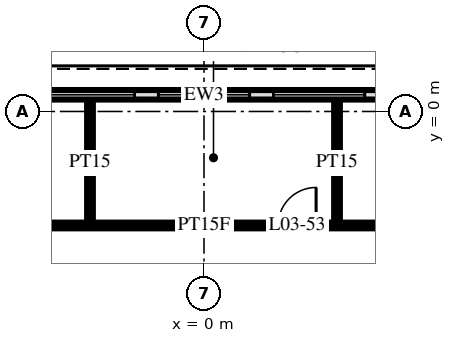
"""IFC4 building model, lengths in metres.
Left out: names, types, materials, properties, quantities, classifications, styles, units other than length and angle.
Written with IfcOpenShell. Run it as: python <this file> out.ifc"""

import sys

from ifc_helpers import new_model, si_unit, direction, frame, frame_2d, origin, place, context, subcontext, project, spatial, rectangle, extrude, element, fill, save


model = new_model("IFC4")
c1 = context("Model", 3, precision=1e-05, world=origin(), true_north=direction((0.0, 1.0)))
c2 = subcontext(c1, "Body", "Model", "MODEL_VIEW")
j1 = project(units=[si_unit("LENGTHUNIT", "METRE"), si_unit("PLANEANGLEUNIT", "RADIAN")], contexts=[c1])
p1 = place(None, origin())
s1 = spatial("IfcSite", under=j1, at=p1, CompositionType="ELEMENT")
p2 = place(p1, origin())
s2 = spatial("IfcBuilding", under=s1, at=p2, CompositionType="ELEMENT")
p3 = place(p2, frame((0.0, 0.0, 18.0)))
s3 = spatial("IfcBuildingStorey", under=s2, at=p3, CompositionType="ELEMENT", Elevation=18.0)
p4 = place(p3, frame((28.713, 0.439, 0.0), z_axis=(0.0, 0.0, 1.0), x_axis=(-1.0, 0.0, 0.0)))
e1 = element("IfcWall", 1, at=p4, inside=s3, PredefinedType="SOLIDWALL", context=c2, shape_type="SweptSolid", body=[
    extrude(rectangle(XDim=57.426, YDim=0.25, at=frame_2d((28.713, 0.0))), origin(), (0.0, 0.0, 1.0), 5.72),
])
p5 = place(p4, frame((0.252, 0.0, 0.858)))
e2 = element("IfcOpeningElement", 2, at=p5, cuts=e1, PredefinedType="OPENING", context=c2, shape_type="SweptSolid", body=[
    extrude(rectangle(XDim=2.4, YDim=3.6, at=frame_2d((1.2, 1.8))), frame((0.0, 0.135, 0.0), z_axis=(0.0, -1.0, 0.0), x_axis=(1.0, 0.0, 0.0)), (0.0, 0.0, 1.0), 0.27),
])
p6 = place(p4, frame((3.281, 0.0, 0.858)))
e3 = element("IfcOpeningElement", 3, at=p6, cuts=e1, PredefinedType="OPENING", context=c2, shape_type="SweptSolid", body=[
    extrude(rectangle(XDim=2.4, YDim=3.6, at=frame_2d((1.2, 1.8))), frame((0.0, 0.135, 0.0), z_axis=(0.0, -1.0, 0.0), x_axis=(1.0, 0.0, 0.0)), (0.0, 0.0, 1.0), 0.27),
])
p7 = place(p4, frame((6.31, 0.0, 0.858)))
e4 = element("IfcOpeningElement", 4, at=p7, cuts=e1, PredefinedType="OPENING", context=c2, shape_type="SweptSolid", body=[
    extrude(rectangle(XDim=2.4, YDim=3.6, at=frame_2d((1.2, 1.8))), frame((0.0, 0.135, 0.0), z_axis=(0.0, -1.0, 0.0), x_axis=(1.0, 0.0, 0.0)), (0.0, 0.0, 1.0), 0.27),
])
p8 = place(p4, frame((9.339, 0.0, 0.858)))
e5 = element("IfcOpeningElement", 5, at=p8, cuts=e1, PredefinedType="OPENING", context=c2, shape_type="SweptSolid", body=[
    extrude(rectangle(XDim=2.4, YDim=3.6, at=frame_2d((1.2, 1.8))), frame((0.0, 0.135, 0.0), z_axis=(0.0, -1.0, 0.0), x_axis=(1.0, 0.0, 0.0)), (0.0, 0.0, 1.0), 0.27),
])
p9 = place(p4, frame((12.368, 0.0, 0.858)))
e6 = element("IfcOpeningElement", 6, at=p9, cuts=e1, PredefinedType="OPENING", context=c2, shape_type="SweptSolid", body=[
    extrude(rectangle(XDim=2.4, YDim=3.6, at=frame_2d((1.2, 1.8))), frame((0.0, 0.135, 0.0), z_axis=(0.0, -1.0, 0.0), x_axis=(1.0, 0.0, 0.0)), (0.0, 0.0, 1.0), 0.27),
])
p10 = place(p4, frame((15.397, 0.0, 0.858)))
e7 = element("IfcOpeningElement", 7, at=p10, cuts=e1, PredefinedType="OPENING", context=c2, shape_type="SweptSolid", body=[
    extrude(rectangle(XDim=2.4, YDim=3.6, at=frame_2d((1.2, 1.8))), frame((0.0, 0.135, 0.0), z_axis=(0.0, -1.0, 0.0), x_axis=(1.0, 0.0, 0.0)), (0.0, 0.0, 1.0), 0.27),
])
p11 = place(p4, frame((18.426, 0.0, 0.858)))
e8 = element("IfcOpeningElement", 8, at=p11, cuts=e1, PredefinedType="OPENING", context=c2, shape_type="SweptSolid", body=[
    extrude(rectangle(XDim=2.4, YDim=3.6, at=frame_2d((1.2, 1.8))), frame((0.0, 0.135, 0.0), z_axis=(0.0, -1.0, 0.0), x_axis=(1.0, 0.0, 0.0)), (0.0, 0.0, 1.0), 0.27),
])
p12 = place(p4, frame((21.455, 0.0, 0.858)))
e9 = element("IfcOpeningElement", 9, at=p12, cuts=e1, PredefinedType="OPENING", context=c2, shape_type="SweptSolid", body=[
    extrude(rectangle(XDim=2.4, YDim=3.6, at=frame_2d((1.2, 1.8))), frame((0.0, 0.135, 0.0), z_axis=(0.0, -1.0, 0.0), x_axis=(1.0, 0.0, 0.0)), (0.0, 0.0, 1.0), 0.27),
])
p13 = place(p4, frame((24.484, 0.0, 0.858)))
e10 = element("IfcOpeningElement", 10, at=p13, cuts=e1, PredefinedType="OPENING", context=c2, shape_type="SweptSolid", body=[
    extrude(rectangle(XDim=2.4, YDim=3.6, at=frame_2d((1.2, 1.8))), frame((0.0, 0.135, 0.0), z_axis=(0.0, -1.0, 0.0), x_axis=(1.0, 0.0, 0.0)), (0.0, 0.0, 1.0), 0.27),
])
p14 = place(p4, frame((27.513, 0.0, 0.858)))
e11 = element("IfcOpeningElement", 11, at=p14, cuts=e1, PredefinedType="OPENING", context=c2, shape_type="SweptSolid", body=[
    extrude(rectangle(XDim=2.4, YDim=3.6, at=frame_2d((1.2, 1.8))), frame((0.0, 0.135, 0.0), z_axis=(0.0, -1.0, 0.0), x_axis=(1.0, 0.0, 0.0)), (0.0, 0.0, 1.0), 0.27),
])
p15 = place(p4, frame((30.542, 0.0, 0.858)))
e12 = element("IfcOpeningElement", 12, at=p15, cuts=e1, PredefinedType="OPENING", context=c2, shape_type="SweptSolid", body=[
    extrude(rectangle(XDim=2.4, YDim=3.6, at=frame_2d((1.2, 1.8))), frame((0.0, 0.135, 0.0), z_axis=(0.0, -1.0, 0.0), x_axis=(1.0, 0.0, 0.0)), (0.0, 0.0, 1.0), 0.27),
])
p16 = place(p4, frame((33.571, 0.0, 0.858)))
e13 = element("IfcOpeningElement", 13, at=p16, cuts=e1, PredefinedType="OPENING", context=c2, shape_type="SweptSolid", body=[
    extrude(rectangle(XDim=2.4, YDim=3.6, at=frame_2d((1.2, 1.8))), frame((0.0, 0.135, 0.0), z_axis=(0.0, -1.0, 0.0), x_axis=(1.0, 0.0, 0.0)), (0.0, 0.0, 1.0), 0.27),
])
p17 = place(p4, frame((36.6, 0.0, 0.858)))
e14 = element("IfcOpeningElement", 14, at=p17, cuts=e1, PredefinedType="OPENING", context=c2, shape_type="SweptSolid", body=[
    extrude(rectangle(XDim=2.4, YDim=3.6, at=frame_2d((1.2, 1.8))), frame((0.0, 0.135, 0.0), z_axis=(0.0, -1.0, 0.0), x_axis=(1.0, 0.0, 0.0)), (0.0, 0.0, 1.0), 0.27),
])
p18 = place(p4, frame((39.629, 0.0, 0.858)))
e15 = element("IfcOpeningElement", 15, at=p18, cuts=e1, PredefinedType="OPENING", context=c2, shape_type="SweptSolid", body=[
    extrude(rectangle(XDim=2.4, YDim=3.6, at=frame_2d((1.2, 1.8))), frame((0.0, 0.135, 0.0), z_axis=(0.0, -1.0, 0.0), x_axis=(1.0, 0.0, 0.0)), (0.0, 0.0, 1.0), 0.27),
])
p19 = place(p4, frame((42.658, 0.0, 0.858)))
e16 = element("IfcOpeningElement", 16, at=p19, cuts=e1, PredefinedType="OPENING", context=c2, shape_type="SweptSolid", body=[
    extrude(rectangle(XDim=2.4, YDim=3.6, at=frame_2d((1.2, 1.8))), frame((0.0, 0.135, 0.0), z_axis=(0.0, -1.0, 0.0), x_axis=(1.0, 0.0, 0.0)), (0.0, 0.0, 1.0), 0.27),
])
p20 = place(p4, frame((45.687, 0.0, 0.858)))
e17 = element("IfcOpeningElement", 17, at=p20, cuts=e1, PredefinedType="OPENING", context=c2, shape_type="SweptSolid", body=[
    extrude(rectangle(XDim=2.4, YDim=3.6, at=frame_2d((1.2, 1.8))), frame((0.0, 0.135, 0.0), z_axis=(0.0, -1.0, 0.0), x_axis=(1.0, 0.0, 0.0)), (0.0, 0.0, 1.0), 0.27),
])
p21 = place(p4, frame((48.716, 0.0, 0.858)))
e18 = element("IfcOpeningElement", 18, at=p21, cuts=e1, PredefinedType="OPENING", context=c2, shape_type="SweptSolid", body=[
    extrude(rectangle(XDim=2.4, YDim=3.6, at=frame_2d((1.2, 1.8))), frame((0.0, 0.135, 0.0), z_axis=(0.0, -1.0, 0.0), x_axis=(1.0, 0.0, 0.0)), (0.0, 0.0, 1.0), 0.27),
])
p22 = place(p4, frame((51.745, 0.0, 0.858)))
e19 = element("IfcOpeningElement", 19, at=p22, cuts=e1, PredefinedType="OPENING", context=c2, shape_type="SweptSolid", body=[
    extrude(rectangle(XDim=2.4, YDim=3.6, at=frame_2d((1.2, 1.8))), frame((0.0, 0.135, 0.0), z_axis=(0.0, -1.0, 0.0), x_axis=(1.0, 0.0, 0.0)), (0.0, 0.0, 1.0), 0.27),
])
p23 = place(p4, frame((54.774, 0.0, 0.858)))
e20 = element("IfcOpeningElement", 20, at=p23, cuts=e1, PredefinedType="OPENING", context=c2, shape_type="SweptSolid", body=[
    extrude(rectangle(XDim=2.4, YDim=3.6, at=frame_2d((1.2, 1.8))), frame((0.0, 0.135, 0.0), z_axis=(0.0, -1.0, 0.0), x_axis=(1.0, 0.0, 0.0)), (0.0, 0.0, 1.0), 0.27),
])
for number, where, z_axis, x_axis in (
    (21, (3.5, -3.0, 0.0), (0.0, 0.0, 1.0), (0.0, 1.0, 0.0)),
    (22, (-3.0, -3.0, 0.0), (0.0, 0.0, 1.0), (0.0, 1.0, 0.0)),
):
    element("IfcWall", number, at=place(p3, frame(where, z_axis=z_axis, x_axis=x_axis)), inside=s3, PredefinedType="PARTITIONING", context=c2, shape_type="SweptSolid", body=[
        extrude(rectangle(XDim=3.312, YDim=0.15, at=frame_2d((1.656, 0.0))), origin(), (0.0, 0.0, 1.0), 5.55),
    ])
p24 = place(p3, frame((-9.95, -3.0, 0.0), z_axis=(0.0, 0.0, 1.0), x_axis=(1.0, 0.0, 0.0)))
e23 = element("IfcWall", 23, at=p24, inside=s3, PredefinedType="PARTITIONING", context=c2, shape_type="SweptSolid", body=[
    extrude(rectangle(XDim=19.9, YDim=0.15, at=frame_2d((9.95, 0.0))), origin(), (0.0, 0.0, 1.0), 5.55),
])
p25 = place(p24, frame((2.0, 0.0, 0.0)))
e24 = element("IfcOpeningElement", 24, at=p25, cuts=e23, PredefinedType="OPENING", context=c2, shape_type="SweptSolid", body=[
    extrude(rectangle(XDim=1.0, YDim=2.1, at=frame_2d((0.5, 1.05))), frame((0.0, 0.085, 0.0), z_axis=(0.0, -1.0, 0.0), x_axis=(1.0, 0.0, 0.0)), (0.0, 0.0, 1.0), 0.17),
])
p26 = place(p24, frame((11.9, 0.0, 0.0)))
e25 = element("IfcOpeningElement", 25, at=p26, cuts=e23, PredefinedType="OPENING", context=c2, shape_type="SweptSolid", body=[
    extrude(rectangle(XDim=1.0, YDim=2.1, at=frame_2d((0.5, 1.05))), frame((0.0, 0.085, 0.0), z_axis=(0.0, -1.0, 0.0), x_axis=(1.0, 0.0, 0.0)), (0.0, 0.0, 1.0), 0.17),
])
p27 = place(p24, frame((16.9, 0.0, 0.0)))
e26 = element("IfcOpeningElement", 26, at=p27, cuts=e23, PredefinedType="OPENING", context=c2, shape_type="SweptSolid", body=[
    extrude(rectangle(XDim=1.0, YDim=2.1, at=frame_2d((0.5, 1.05))), frame((0.0, 0.085, 0.0), z_axis=(0.0, -1.0, 0.0), x_axis=(1.0, 0.0, 0.0)), (0.0, 0.0, 1.0), 0.17),
])
p28 = place(p13, origin())
e27 = element("IfcWindow", 27, at=p28, inside=s3, PartitioningType="SINGLE_PANEL", PredefinedType="USERDEFINED", context=c2, shape_type="SweptSolid", body=[
    extrude(rectangle(XDim=2.4, YDim=3.6, at=frame_2d((1.2, 1.8))), frame((0.0, 0.125, 0.0), z_axis=(0.0, -1.0, 0.0), x_axis=(1.0, 0.0, 0.0)), (0.0, 0.0, 1.0), 0.06),
])
fill(e10, e27)
p29 = place(p14, origin())
e28 = element("IfcWindow", 28, at=p29, inside=s3, PartitioningType="SINGLE_PANEL", PredefinedType="USERDEFINED", context=c2, shape_type="SweptSolid", body=[
    extrude(rectangle(XDim=2.4, YDim=3.6, at=frame_2d((1.2, 1.8))), frame((0.0, 0.125, 0.0), z_axis=(0.0, -1.0, 0.0), x_axis=(1.0, 0.0, 0.0)), (0.0, 0.0, 1.0), 0.06),
])
fill(e11, e28)
p30 = place(p15, origin())
e29 = element("IfcWindow", 29, at=p30, inside=s3, PartitioningType="SINGLE_PANEL", PredefinedType="USERDEFINED", context=c2, shape_type="SweptSolid", body=[
    extrude(rectangle(XDim=2.4, YDim=3.6, at=frame_2d((1.2, 1.8))), frame((0.0, 0.125, 0.0), z_axis=(0.0, -1.0, 0.0), x_axis=(1.0, 0.0, 0.0)), (0.0, 0.0, 1.0), 0.06),
])
fill(e12, e29)
p31 = place(p26, origin())
e30 = element("IfcDoor", 30, at=p31, inside=s3, OperationType="SINGLE_SWING_LEFT", PredefinedType="DOOR", context=c2, shape_type="SweptSolid", body=[
    extrude(rectangle(XDim=1.0, YDim=2.1, at=frame_2d((0.5, 1.05))), frame((0.0, 0.025, 0.0), z_axis=(0.0, -1.0, 0.0), x_axis=(1.0, 0.0, 0.0)), (0.0, 0.0, 1.0), 0.05),
])
fill(e25, e30)
save(model, sys.argv[1])
